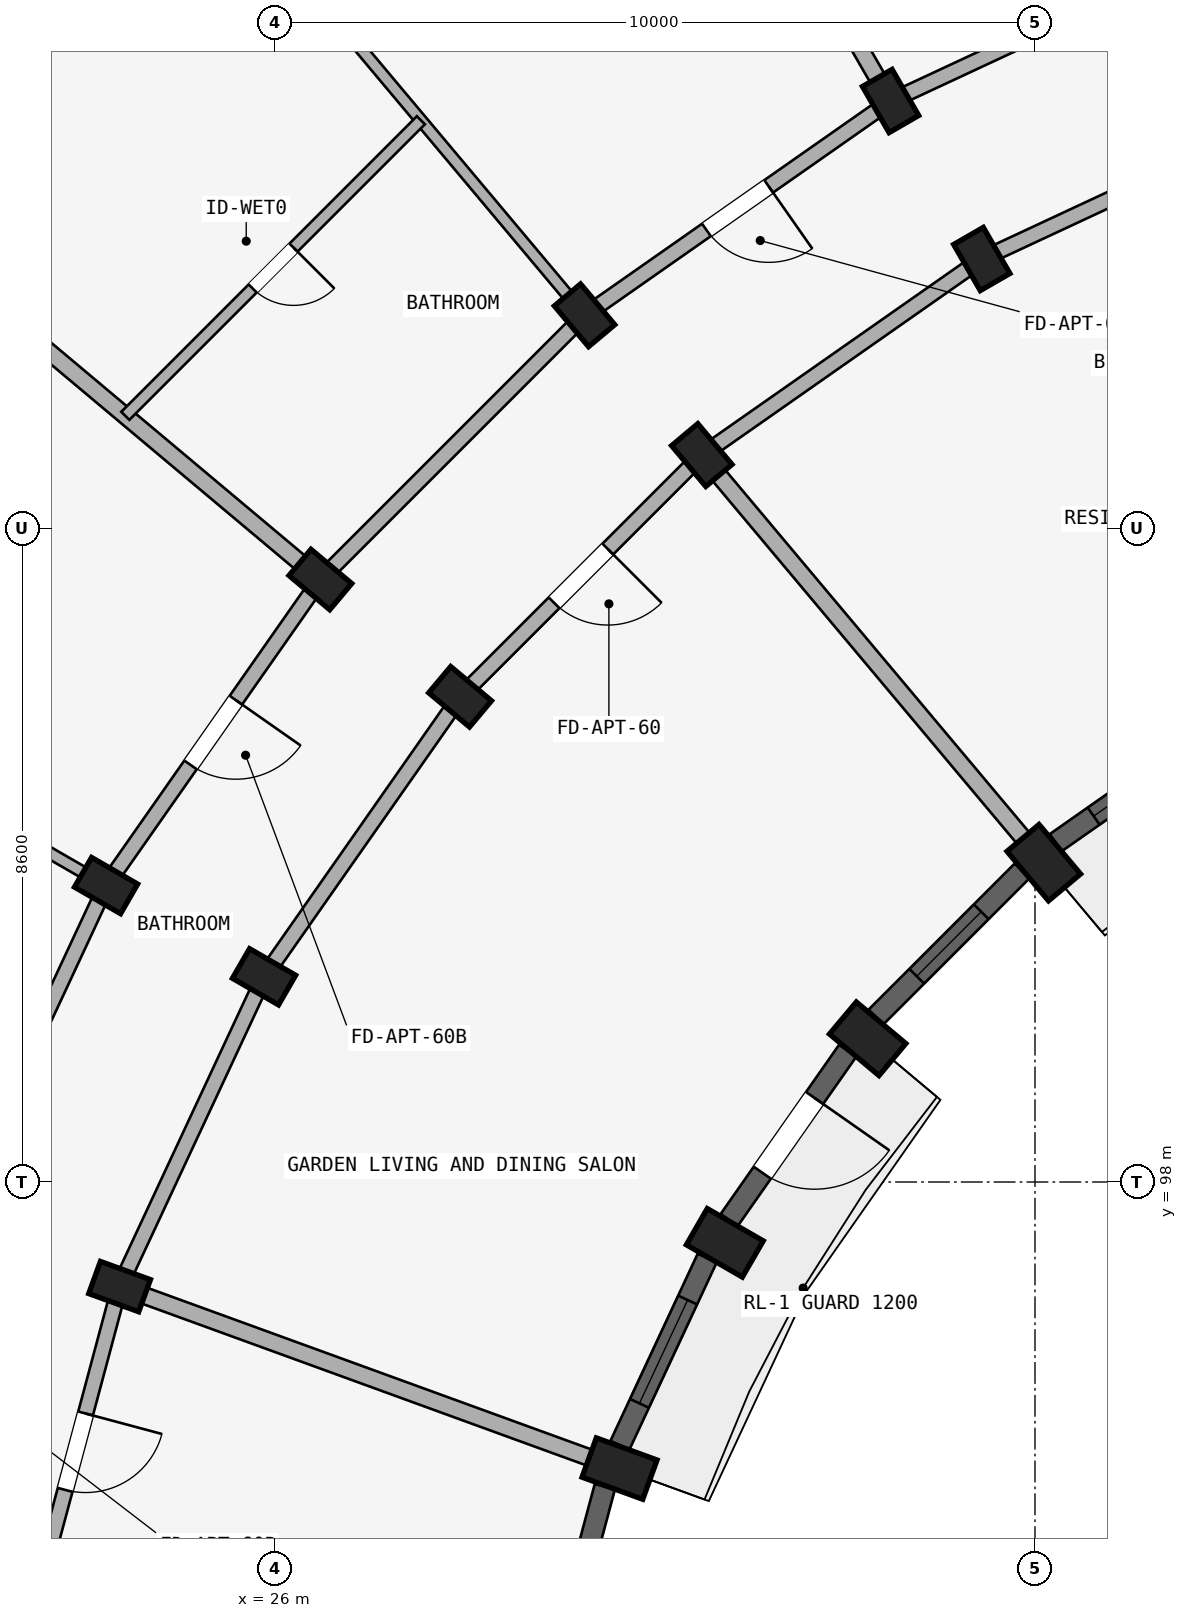
"""IFC4 building model, lengths in metres.
Left out: names, types, materials, properties, quantities, classifications, styles, units other than length and angle.
Written with IfcOpenShell. Run it as: python <this file> out.ifc"""

import sys

from ifc_helpers import new_model, si_unit, direction, frame, frame_2d, origin, origin_2d, place, context, subcontext, project, spatial, rectangle, extrude, element, fill, save


model = new_model("IFC4")
c1 = context("Model", 3, precision=1e-05, world=origin(), true_north=direction((0.0, 1.0)))
c2 = subcontext(c1, "Body", "Model", "MODEL_VIEW")
j1 = project(units=[si_unit("LENGTHUNIT", "METRE"), si_unit("PLANEANGLEUNIT", "RADIAN")], contexts=[c1])
p1 = place(None, origin())
s1 = spatial("IfcSite", under=j1, at=p1, CompositionType="ELEMENT")
p2 = place(p1, origin())
s2 = spatial("IfcBuilding", under=s1, at=p2, CompositionType="ELEMENT")
p3 = place(p2, frame((0.0, 0.0, 15.0)))
s3 = spatial("IfcBuildingStorey", under=s2, at=p3, CompositionType="ELEMENT", Elevation=15.0)
for number, where, z_axis, x_axis in (
    (1, (35.3, 110.144, 0.0), (0.0, 0.0, 1.0), (0.866, 0.5, 0.0)),
    (2, (34.1, 112.222, 0.0), (0.0, 0.0, 1.0), (0.866, 0.5, 0.0)),
):
    element("IfcColumn", number, at=place(p3, frame(where, z_axis=z_axis, x_axis=x_axis)), inside=s3, PredefinedType="COLUMN", context=c2, shape_type="SweptSolid", body=[
        extrude(rectangle(XDim=0.45, YDim=0.7, at=origin_2d()), origin(), (0.0, 0.0, 1.0), 2.93),
    ])
p4 = place(p3, frame((36.115, 102.202, 0.0), z_axis=(0.0, 0.0, 1.0), x_axis=(0.766044443119, 0.642787609687, 0.0)))
e3 = element("IfcColumn", 3, at=p4, inside=s3, PredefinedType="COLUMN", context=c2, shape_type="SweptSolid", body=[
    extrude(rectangle(XDim=0.55, YDim=0.85, at=origin_2d()), origin(), (0.0, 0.0, 1.0), 2.93),
])
for number, where, z_axis, x_axis in (
    (4, (31.616, 107.564, 0.0), (0.0, 0.0, 1.0), (0.766, 0.643, 0.0)),
    (5, (30.073, 109.402, 0.0), (0.0, 0.0, 1.0), (0.766, 0.643, 0.0)),
):
    element("IfcColumn", number, at=place(p3, frame(where, z_axis=z_axis, x_axis=x_axis)), inside=s3, PredefinedType="COLUMN", context=c2, shape_type="SweptSolid", body=[
        extrude(rectangle(XDim=0.45, YDim=0.7, at=origin_2d()), origin(), (0.0, 0.0, 1.0), 2.93),
    ])
p5 = place(p3, frame((33.798, 99.885, 0.0), z_axis=(0.0, 0.0, 1.0), x_axis=(0.642787609687, 0.766044443119, 0.0)))
e6 = element("IfcColumn", 6, at=p5, inside=s3, PredefinedType="COLUMN", context=c2, shape_type="SweptSolid", body=[
    extrude(rectangle(XDim=0.55, YDim=0.85, at=origin_2d()), origin(), (0.0, 0.0, 1.0), 2.93),
])
for number, where, z_axis, x_axis in (
    (7, (28.436, 104.384, 0.0), (0.0, 0.0, 1.0), (0.643, 0.766, 0.0)),
    (8, (26.598, 105.927, 0.0), (0.0, 0.0, 1.0), (0.643, 0.766, 0.0)),
):
    element("IfcColumn", number, at=place(p3, frame(where, z_axis=z_axis, x_axis=x_axis)), inside=s3, PredefinedType="COLUMN", context=c2, shape_type="SweptSolid", body=[
        extrude(rectangle(XDim=0.45, YDim=0.7, at=origin_2d()), origin(), (0.0, 0.0, 1.0), 2.93),
    ])
p6 = place(p3, frame((31.919, 97.2, 0.0), z_axis=(0.0, 0.0, 1.0), x_axis=(0.5, 0.866025403784, 0.0)))
e9 = element("IfcColumn", 9, at=p6, inside=s3, PredefinedType="COLUMN", context=c2, shape_type="SweptSolid", body=[
    extrude(rectangle(XDim=0.55, YDim=0.85, at=origin_2d()), origin(), (0.0, 0.0, 1.0), 2.93),
])
for number, where, z_axis, x_axis in (
    (10, (25.856, 100.7, 0.0), (0.0, 0.0, 1.0), (0.5, 0.866, 0.0)),
    (11, (23.778, 101.9, 0.0), (0.0, 0.0, 1.0), (0.5, 0.866, 0.0)),
):
    element("IfcColumn", number, at=place(p3, frame(where, z_axis=z_axis, x_axis=x_axis)), inside=s3, PredefinedType="COLUMN", context=c2, shape_type="SweptSolid", body=[
        extrude(rectangle(XDim=0.45, YDim=0.7, at=origin_2d()), origin(), (0.0, 0.0, 1.0), 2.93),
    ])
p7 = place(p3, frame((30.534, 94.23, 0.0), z_axis=(0.0, 0.0, 1.0), x_axis=(0.342020143326, 0.939692620786, 0.0)))
e12 = element("IfcColumn", 12, at=p7, inside=s3, PredefinedType="COLUMN", context=c2, shape_type="SweptSolid", body=[
    extrude(rectangle(XDim=0.55, YDim=0.85, at=origin_2d()), origin(), (0.0, 0.0, 1.0), 2.93),
])
p8 = place(p3, frame((23.956, 96.624, 0.0), z_axis=(0.0, 0.0, 1.0), x_axis=(0.342020143326, 0.939692620786, 0.0)))
e13 = element("IfcColumn", 13, at=p8, inside=s3, PredefinedType="COLUMN", context=c2, shape_type="SweptSolid", body=[
    extrude(rectangle(XDim=0.45, YDim=0.7, at=origin_2d()), origin(), (0.0, 0.0, 1.0), 2.93),
])
p9 = place(p3, frame((39.376, 112.044, 0.0), z_axis=(0.0, 0.0, 1.0), x_axis=(-0.906307919131, -0.422617978463, 0.0)))
e14 = element("IfcWall", 14, at=p9, inside=s3, PredefinedType="STANDARD", context=c2, shape_type="SweptSolid", body=[
    extrude(rectangle(XDim=4.497, YDim=0.2, at=frame_2d((2.249, 0.0))), origin(), (0.0, 0.0, 1.0), 2.372),
])
p10 = place(p3, frame((38.555, 114.299, 0.0), z_axis=(0.0, 0.0, 1.0), x_axis=(-0.906302381024, -0.422629854778, 0.0)))
e15 = element("IfcWall", 15, at=p10, inside=s3, PredefinedType="STANDARD", context=c2, shape_type="SweptSolid", body=[
    extrude(rectangle(XDim=4.915, YDim=0.2, at=frame_2d((2.458, 0.0))), origin(), (0.0, 0.0, 1.0), 2.372),
])
p11 = place(p3, frame((35.3, 110.144, 0.0), z_axis=(0.0, 0.0, 1.0), x_axis=(-0.819155404658, -0.573571637217, 0.0)))
e16 = element("IfcWall", 16, at=p11, inside=s3, PredefinedType="STANDARD", context=c2, shape_type="SweptSolid", body=[
    extrude(rectangle(XDim=4.497, YDim=0.2, at=frame_2d((2.249, 0.0))), origin(), (0.0, 0.0, 1.0), 2.372),
])
p12 = place(p3, frame((34.1, 112.222, 0.0), z_axis=(0.0, 0.0, 1.0), x_axis=(-0.819140911474, -0.573592335331, 0.0)))
e17 = element("IfcWall", 17, at=p12, inside=s3, PredefinedType="STANDARD", context=c2, shape_type="SweptSolid", body=[
    extrude(rectangle(XDim=4.916, YDim=0.2, at=frame_2d((2.458, 0.0))), origin(), (0.0, 0.0, 1.0), 2.372),
])
p13 = place(p12, frame((1.958, 0.0, 0.0)))
e18 = element("IfcOpeningElement", 18, at=p13, cuts=e17, PredefinedType="OPENING", context=c2, shape_type="SweptSolid", body=[
    extrude(rectangle(XDim=1.0, YDim=2.15, at=frame_2d((0.5, 1.075))), frame((0.0, 0.11, 0.0), z_axis=(0.0, -1.0, 0.0), x_axis=(1.0, 0.0, 0.0)), (0.0, 0.0, 1.0), 0.22),
])
p14 = place(p3, frame((31.616, 107.564, 0.0), z_axis=(0.0, 0.0, 1.0), x_axis=(-0.707106781187, -0.707106781187, 0.0)))
e19 = element("IfcWall", 19, at=p14, inside=s3, PredefinedType="STANDARD", context=c2, shape_type="SweptSolid", body=[
    extrude(rectangle(XDim=4.497, YDim=0.2, at=frame_2d((2.249, 0.0))), origin(), (0.0, 0.0, 1.0), 2.372),
])
p15 = place(p14, frame((1.749, 0.0, 0.0)))
e20 = element("IfcOpeningElement", 20, at=p15, cuts=e19, PredefinedType="OPENING", context=c2, shape_type="SweptSolid", body=[
    extrude(rectangle(XDim=1.0, YDim=2.15, at=frame_2d((0.5, 1.075))), frame((0.0, 0.11, 0.0), z_axis=(0.0, -1.0, 0.0), x_axis=(1.0, 0.0, 0.0)), (0.0, 0.0, 1.0), 0.22),
])
p16 = place(p3, frame((30.073, 109.402, 0.0), z_axis=(0.0, 0.0, 1.0), x_axis=(-0.707106781187, -0.707106781187, 0.0)))
e21 = element("IfcWall", 21, at=p16, inside=s3, PredefinedType="STANDARD", context=c2, shape_type="SweptSolid", body=[
    extrude(rectangle(XDim=4.916, YDim=0.2, at=frame_2d((2.458, 0.0))), origin(), (0.0, 0.0, 1.0), 2.372),
])
p17 = place(p3, frame((28.436, 104.384, 0.0), z_axis=(0.0, 0.0, 1.0), x_axis=(-0.573571637217, -0.819155404658, 0.0)))
e22 = element("IfcWall", 22, at=p17, inside=s3, PredefinedType="STANDARD", context=c2, shape_type="SweptSolid", body=[
    extrude(rectangle(XDim=4.497, YDim=0.2, at=frame_2d((2.249, 0.0))), origin(), (0.0, 0.0, 1.0), 2.372),
])
p18 = place(p3, frame((26.598, 105.927, 0.0), z_axis=(0.0, 0.0, 1.0), x_axis=(-0.573592335331, -0.819140911474, 0.0)))
e23 = element("IfcWall", 23, at=p18, inside=s3, PredefinedType="STANDARD", context=c2, shape_type="SweptSolid", body=[
    extrude(rectangle(XDim=4.916, YDim=0.2, at=frame_2d((2.458, 0.0))), origin(), (0.0, 0.0, 1.0), 2.372),
])
p19 = place(p18, frame((1.938, 0.0, 0.0)))
e24 = element("IfcOpeningElement", 24, at=p19, cuts=e23, PredefinedType="OPENING", context=c2, shape_type="SweptSolid", body=[
    extrude(rectangle(XDim=1.04, YDim=2.15, at=frame_2d((0.52, 1.075))), frame((0.0, 0.11, 0.0), z_axis=(0.0, -1.0, 0.0), x_axis=(1.0, 0.0, 0.0)), (0.0, 0.0, 1.0), 0.22),
])
p20 = place(p3, frame((25.856, 100.7, 0.0), z_axis=(0.0, 0.0, 1.0), x_axis=(-0.422617978463, -0.906307919131, 0.0)))
e25 = element("IfcWall", 25, at=p20, inside=s3, PredefinedType="STANDARD", context=c2, shape_type="SweptSolid", body=[
    extrude(rectangle(XDim=4.497, YDim=0.2, at=frame_2d((2.249, 0.0))), origin(), (0.0, 0.0, 1.0), 2.372),
])
p21 = place(p3, frame((23.778, 101.9, 0.0), z_axis=(0.0, 0.0, 1.0), x_axis=(-0.422629854778, -0.906302381024, 0.0)))
e26 = element("IfcWall", 26, at=p21, inside=s3, PredefinedType="STANDARD", context=c2, shape_type="SweptSolid", body=[
    extrude(rectangle(XDim=4.915, YDim=0.2, at=frame_2d((2.458, 0.0))), origin(), (0.0, 0.0, 1.0), 2.372),
])
p22 = place(p3, frame((23.956, 96.624, 0.0), z_axis=(0.0, 0.0, 1.0), x_axis=(-0.258787642463, -0.965934240054, 0.0)))
e27 = element("IfcWall", 27, at=p22, inside=s3, PredefinedType="STANDARD", context=c2, shape_type="SweptSolid", body=[
    extrude(rectangle(XDim=4.497, YDim=0.2, at=frame_2d((2.249, 0.0))), origin(), (0.0, 0.0, 1.0), 2.372),
])
p23 = place(p22, frame((1.729, 0.0, 0.0)))
e28 = element("IfcOpeningElement", 28, at=p23, cuts=e27, PredefinedType="OPENING", context=c2, shape_type="SweptSolid", body=[
    extrude(rectangle(XDim=1.04, YDim=2.15, at=frame_2d((0.52, 1.075))), frame((0.0, 0.11, 0.0), z_axis=(0.0, -1.0, 0.0), x_axis=(1.0, 0.0, 0.0)), (0.0, 0.0, 1.0), 0.22),
])
p24 = place(p3, frame((34.05, 112.309, 0.0), z_axis=(0.0, 0.0, 1.0), x_axis=(-0.499997843263, 0.866026648973, 0.0)))
e29 = element("IfcWall", 29, at=p24, inside=s3, PredefinedType="STANDARD", context=c2, shape_type="SweptSolid", body=[
    extrude(rectangle(XDim=17.42, YDim=0.22, at=frame_2d((8.71, 0.0))), origin(), (0.0, 0.0, 1.0), 2.372),
])
p25 = place(p3, frame((35.987, 102.355, 0.0), z_axis=(0.0, 0.0, 1.0), x_axis=(-0.642784846501, 0.766046761698, 0.0)))
e30 = element("IfcWall", 30, at=p25, inside=s3, PredefinedType="STANDARD", context=c2, shape_type="SweptSolid", body=[
    extrude(rectangle(XDim=6.75, YDim=0.22, at=frame_2d((3.375, 0.0))), origin(), (0.0, 0.0, 1.0), 2.372),
])
p26 = place(p3, frame((30.009, 109.479, 0.0), z_axis=(0.0, 0.0, 1.0), x_axis=(-0.642784757967, 0.766046835987, 0.0)))
e31 = element("IfcWall", 31, at=p26, inside=s3, PredefinedType="PARTITIONING", context=c2, shape_type="SweptSolid", body=[
    extrude(rectangle(XDim=17.42, YDim=0.15, at=frame_2d((8.71, 0.0))), origin(), (0.0, 0.0, 1.0), 2.372),
])
p27 = place(p26, frame((7.5, 0.0, 0.0)))
e32 = element("IfcOpeningElement", 32, at=p27, cuts=e31, PredefinedType="OPENING", context=c2, shape_type="SweptSolid", body=[
    extrude(rectangle(XDim=0.8, YDim=2.1, at=frame_2d((0.4, 1.05))), frame((0.0, 0.085, 0.0), z_axis=(0.0, -1.0, 0.0), x_axis=(1.0, 0.0, 0.0)), (0.0, 0.0, 1.0), 0.17),
])
p28 = place(p3, frame((26.521, 105.991, 0.0), z_axis=(0.0, 0.0, 1.0), x_axis=(-0.766046835987, 0.642784757967, 0.0)))
e33 = element("IfcWall", 33, at=p28, inside=s3, PredefinedType="STANDARD", context=c2, shape_type="SweptSolid", body=[
    extrude(rectangle(XDim=17.42, YDim=0.22, at=frame_2d((8.71, 0.0))), origin(), (0.0, 0.0, 1.0), 2.372),
])
p29 = place(p3, frame((23.691, 101.95, 0.0), z_axis=(0.0, 0.0, 1.0), x_axis=(-0.866026648973, 0.499997843263, 0.0)))
e34 = element("IfcWall", 34, at=p29, inside=s3, PredefinedType="PARTITIONING", context=c2, shape_type="SweptSolid", body=[
    extrude(rectangle(XDim=17.42, YDim=0.15, at=frame_2d((8.71, 0.0))), origin(), (0.0, 0.0, 1.0), 2.372),
])
p30 = place(p29, frame((7.5, 0.0, 0.0)))
e35 = element("IfcOpeningElement", 35, at=p30, cuts=e34, PredefinedType="OPENING", context=c2, shape_type="SweptSolid", body=[
    extrude(rectangle(XDim=0.8, YDim=2.1, at=frame_2d((0.4, 1.05))), frame((0.0, 0.085, 0.0), z_axis=(0.0, -1.0, 0.0), x_axis=(1.0, 0.0, 0.0)), (0.0, 0.0, 1.0), 0.17),
])
p31 = place(p3, frame((30.346, 94.298, 0.0), z_axis=(0.0, 0.0, 1.0), x_axis=(-0.939696231917, 0.342010221662, 0.0)))
e36 = element("IfcWall", 36, at=p31, inside=s3, PredefinedType="STANDARD", context=c2, shape_type="SweptSolid", body=[
    extrude(rectangle(XDim=6.75, YDim=0.22, at=frame_2d((3.375, 0.0))), origin(), (0.0, 0.0, 1.0), 2.372),
])
p32 = place(p3, frame((27.92, 111.969, 0.0), z_axis=(0.0, 0.0, 1.0), x_axis=(-0.707106781187, -0.707106781187, 0.0)))
e37 = element("IfcWall", 37, at=p32, inside=s3, PredefinedType="PLUMBINGWALL", context=c2, shape_type="SweptSolid", body=[
    extrude(rectangle(XDim=5.5, YDim=0.15, at=frame_2d((2.75, 0.0))), origin(), (0.0, 0.0, 1.0), 2.372),
])
p33 = place(p32, frame((2.37, 0.0, 0.0)))
e38 = element("IfcOpeningElement", 38, at=p33, cuts=e37, PredefinedType="OPENING", context=c2, shape_type="SweptSolid", body=[
    extrude(rectangle(XDim=0.76, YDim=2.05, at=frame_2d((0.38, 1.025))), frame((0.0, 0.085, 0.0), z_axis=(0.0, -1.0, 0.0), x_axis=(1.0, 0.0, 0.0)), (0.0, 0.0, 1.0), 0.17),
])
p34 = place(p3, frame((38.499, 104.023, 0.0), z_axis=(0.0, 0.0, 1.0), x_axis=(-0.81917282593, -0.573546755948, 0.0)))
e39 = element("IfcWall", 39, at=p34, inside=s3, PredefinedType="STANDARD", context=c2, shape_type="SweptSolid", body=[
    extrude(rectangle(XDim=2.718, YDim=0.275, at=frame_2d((1.359, 0.0))), origin(), (0.0, 0.0, 1.0), 2.472),
])
p35 = place(p34, frame((0.609, 0.0, 0.622)))
e40 = element("IfcOpeningElement", 40, at=p35, cuts=e39, PredefinedType="OPENING", context=c2, shape_type="SweptSolid", body=[
    extrude(rectangle(XDim=1.5, YDim=1.65, at=frame_2d((0.75, 0.825))), frame((0.0, 0.147, 0.0), z_axis=(0.0, -1.0, 0.0), x_axis=(1.0, 0.0, 0.0)), (0.0, 0.0, 1.0), 0.295),
])
p36 = place(p3, frame((35.829, 102.092, 0.0), z_axis=(0.0, 0.0, 1.0), x_axis=(-0.707106781187, -0.707106781187, 0.0)))
e41 = element("IfcWall", 41, at=p36, inside=s3, PredefinedType="STANDARD", context=c2, shape_type="SweptSolid", body=[
    extrude(rectangle(XDim=2.718, YDim=0.275, at=frame_2d((1.359, 0.0))), origin(), (0.0, 0.0, 1.0), 2.472),
])
p37 = place(p36, frame((0.759, 0.0, 0.772)))
e42 = element("IfcOpeningElement", 42, at=p37, cuts=e41, PredefinedType="OPENING", context=c2, shape_type="SweptSolid", body=[
    extrude(rectangle(XDim=1.2, YDim=1.5, at=frame_2d((0.6, 0.75))), frame((0.0, 0.147, 0.0), z_axis=(0.0, -1.0, 0.0), x_axis=(1.0, 0.0, 0.0)), (0.0, 0.0, 1.0), 0.295),
])
p38 = place(p3, frame((33.535, 99.727, 0.0), z_axis=(0.0, 0.0, 1.0), x_axis=(-0.573546755948, -0.81917282593, 0.0)))
e43 = element("IfcWall", 43, at=p38, inside=s3, PredefinedType="STANDARD", context=c2, shape_type="SweptSolid", body=[
    extrude(rectangle(XDim=2.718, YDim=0.275, at=frame_2d((1.359, 0.0))), origin(), (0.0, 0.0, 1.0), 2.472),
])
p39 = place(p38, frame((0.759, 0.0, 0.0)))
e44 = element("IfcOpeningElement", 44, at=p39, cuts=e43, PredefinedType="OPENING", context=c2, shape_type="SweptSolid", body=[
    extrude(rectangle(XDim=1.2, YDim=2.15, at=frame_2d((0.6, 1.075))), frame((0.0, 0.147, 0.0), z_axis=(0.0, -1.0, 0.0), x_axis=(1.0, 0.0, 0.0)), (0.0, 0.0, 1.0), 0.295),
])
p40 = place(p3, frame((31.687, 96.999, 0.0), z_axis=(0.0, 0.0, 1.0), x_axis=(-0.422610022166, -0.906311629168, 0.0)))
e45 = element("IfcWall", 45, at=p40, inside=s3, PredefinedType="STANDARD", context=c2, shape_type="SweptSolid", body=[
    extrude(rectangle(XDim=2.718, YDim=0.275, at=frame_2d((1.359, 0.0))), origin(), (0.0, 0.0, 1.0), 2.472),
])
p41 = place(p40, frame((0.609, 0.0, 0.622)))
e46 = element("IfcOpeningElement", 46, at=p41, cuts=e45, PredefinedType="OPENING", context=c2, shape_type="SweptSolid", body=[
    extrude(rectangle(XDim=1.5, YDim=1.65, at=frame_2d((0.75, 0.825))), frame((0.0, 0.147, 0.0), z_axis=(0.0, -1.0, 0.0), x_axis=(1.0, 0.0, 0.0)), (0.0, 0.0, 1.0), 0.295),
])
p42 = place(p3, frame((30.341, 93.992, 0.0), z_axis=(0.0, 0.0, 1.0), x_axis=(-0.258819907011, -0.965925595341, 0.0)))
e47 = element("IfcWall", 47, at=p42, inside=s3, PredefinedType="STANDARD", context=c2, shape_type="SweptSolid", body=[
    extrude(rectangle(XDim=2.718, YDim=0.275, at=frame_2d((1.359, 0.0))), origin(), (0.0, 0.0, 1.0), 2.472),
])
p43 = place(p42, frame((0.759, 0.0, 0.772)))
e48 = element("IfcOpeningElement", 48, at=p43, cuts=e47, PredefinedType="OPENING", context=c2, shape_type="SweptSolid", body=[
    extrude(rectangle(XDim=1.2, YDim=1.5, at=frame_2d((0.6, 0.75))), frame((0.0, 0.147, 0.0), z_axis=(0.0, -1.0, 0.0), x_axis=(1.0, 0.0, 0.0)), (0.0, 0.0, 1.0), 0.295),
])
p44 = place(p35, origin())
e49 = element("IfcWindow", 49, at=p44, inside=s3, PartitioningType="DOUBLE_PANEL_VERTICAL", PredefinedType="WINDOW", context=c2, shape_type="SweptSolid", body=[
    extrude(rectangle(XDim=1.5, YDim=1.65, at=frame_2d((0.75, 0.825))), frame((0.0, 0.03, 0.0), z_axis=(0.0, -1.0, 0.0), x_axis=(1.0, 0.0, 0.0)), (0.0, 0.0, 1.0), 0.06),
])
fill(e40, e49)
p45 = place(p37, origin())
e50 = element("IfcWindow", 50, at=p45, inside=s3, PartitioningType="SINGLE_PANEL", PredefinedType="WINDOW", context=c2, shape_type="SweptSolid", body=[
    extrude(rectangle(XDim=1.2, YDim=1.5, at=frame_2d((0.6, 0.75))), frame((0.0, 0.03, 0.0), z_axis=(0.0, -1.0, 0.0), x_axis=(1.0, 0.0, 0.0)), (0.0, 0.0, 1.0), 0.06),
])
fill(e42, e50)
p46 = place(p41, origin())
e51 = element("IfcWindow", 51, at=p46, inside=s3, PartitioningType="DOUBLE_PANEL_VERTICAL", PredefinedType="WINDOW", context=c2, shape_type="SweptSolid", body=[
    extrude(rectangle(XDim=1.5, YDim=1.65, at=frame_2d((0.75, 0.825))), frame((0.0, 0.03, 0.0), z_axis=(0.0, -1.0, 0.0), x_axis=(1.0, 0.0, 0.0)), (0.0, 0.0, 1.0), 0.06),
])
fill(e46, e51)
p47 = place(p13, frame((1.0, 0.0, 0.0), z_axis=(0.0, 0.0, 1.0), x_axis=(-1.0, 0.0, 0.0)))
e52 = element("IfcDoor", 52, at=p47, inside=s3, OperationType="SINGLE_SWING_RIGHT", PredefinedType="DOOR", context=c2, shape_type="SweptSolid", body=[
    extrude(rectangle(XDim=1.0, YDim=2.15, at=frame_2d((0.5, 1.075))), frame((0.0, 0.025, 0.0), z_axis=(0.0, -1.0, 0.0), x_axis=(1.0, 0.0, 0.0)), (0.0, 0.0, 1.0), 0.05),
])
fill(e18, e52)
p48 = place(p33, origin())
e53 = element("IfcDoor", 53, at=p48, inside=s3, OperationType="SINGLE_SWING_LEFT", PredefinedType="DOOR", context=c2, shape_type="SweptSolid", body=[
    extrude(rectangle(XDim=0.76, YDim=2.05, at=frame_2d((0.38, 1.025))), frame((0.0, 0.025, 0.0), z_axis=(0.0, -1.0, 0.0), x_axis=(1.0, 0.0, 0.0)), (0.0, 0.0, 1.0), 0.05),
])
fill(e38, e53)
p49 = place(p19, frame((1.04, 0.0, 0.0), z_axis=(0.0, 0.0, 1.0), x_axis=(-1.0, 0.0, 0.0)))
e54 = element("IfcDoor", 54, at=p49, inside=s3, OperationType="SINGLE_SWING_RIGHT", PredefinedType="DOOR", context=c2, shape_type="SweptSolid", body=[
    extrude(rectangle(XDim=1.04, YDim=2.15, at=frame_2d((0.52, 1.075))), frame((0.0, 0.025, 0.0), z_axis=(0.0, -1.0, 0.0), x_axis=(1.0, 0.0, 0.0)), (0.0, 0.0, 1.0), 0.05),
])
fill(e24, e54)
p50 = place(p15, frame((1.0, 0.0, 0.0), z_axis=(0.0, 0.0, 1.0), x_axis=(-1.0, 0.0, 0.0)))
e55 = element("IfcDoor", 55, at=p50, inside=s3, OperationType="SINGLE_SWING_RIGHT", PredefinedType="DOOR", context=c2, shape_type="SweptSolid", body=[
    extrude(rectangle(XDim=1.0, YDim=2.15, at=frame_2d((0.5, 1.075))), frame((0.0, 0.025, 0.0), z_axis=(0.0, -1.0, 0.0), x_axis=(1.0, 0.0, 0.0)), (0.0, 0.0, 1.0), 0.05),
])
fill(e20, e55)
p51 = place(p23, origin())
e56 = element("IfcDoor", 56, at=p51, inside=s3, OperationType="SINGLE_SWING_LEFT", PredefinedType="DOOR", context=c2, shape_type="SweptSolid", body=[
    extrude(rectangle(XDim=1.04, YDim=2.15, at=frame_2d((0.52, 1.075))), frame((0.0, 0.025, 0.0), z_axis=(0.0, -1.0, 0.0), x_axis=(1.0, 0.0, 0.0)), (0.0, 0.0, 1.0), 0.05),
])
fill(e28, e56)
p52 = place(p39, origin())
e57 = element("IfcDoor", 57, at=p52, inside=s3, OperationType="SINGLE_SWING_LEFT", PredefinedType="DOOR", context=c2, shape_type="SweptSolid", body=[
    extrude(rectangle(XDim=1.2, YDim=2.15, at=frame_2d((0.6, 1.075))), frame((0.0, 0.025, 0.0), z_axis=(0.0, -1.0, 0.0), x_axis=(1.0, 0.0, 0.0)), (0.0, 0.0, 1.0), 0.05),
])
fill(e44, e57)
save(model, sys.argv[1])
